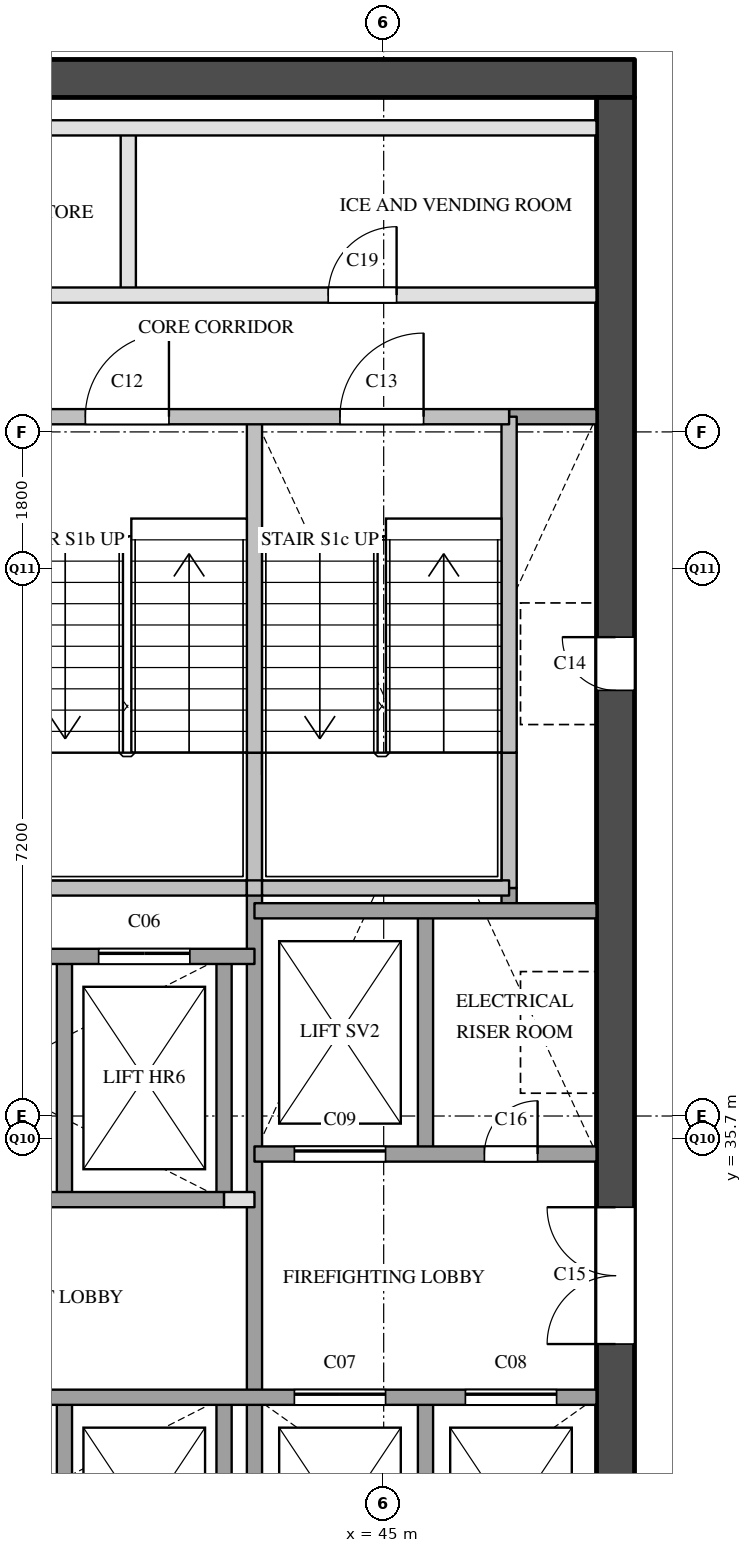
"""IFC4 building model, lengths in metres.
Left out: names, types, materials, properties, quantities, classifications, styles, units other than length and angle.
Written with IfcOpenShell. Run it as: python <this file> out.ifc"""

import sys

from ifc_helpers import new_model, si_unit, direction, frame, frame_2d, origin, place, context, subcontext, project, spatial, rectangle, extrude, element, fill, save


model = new_model("IFC4")
c1 = context("Model", 3, precision=1e-05, world=origin(), true_north=direction((0.0, 1.0)))
c2 = subcontext(c1, "Body", "Model", "MODEL_VIEW")
j1 = project(units=[si_unit("LENGTHUNIT", "METRE"), si_unit("PLANEANGLEUNIT", "RADIAN")], contexts=[c1])
p1 = place(None, origin())
s1 = spatial("IfcSite", under=j1, at=p1, CompositionType="ELEMENT")
p2 = place(p1, origin())
s2 = spatial("IfcBuilding", under=s1, at=p2, CompositionType="ELEMENT")
p3 = place(p2, frame((0.0, 0.0, 150.5)))
s3 = spatial("IfcBuildingStorey", under=s2, at=p3, CompositionType="ELEMENT", Elevation=150.5)
p4 = place(p3, frame((36.1, 49.65, 0.0), z_axis=(0.0, 0.0, 1.0), x_axis=(1.0, 0.0, 0.0)))
e1 = element("IfcWall", 1, at=p4, inside=s3, PredefinedType="SHEAR", context=c2, shape_type="SweptSolid", body=[
    extrude(rectangle(XDim=12.2, YDim=0.5, at=frame_2d((6.1, 0.0))), origin(), (0.0, 0.0, 1.0), 3.6),
])
p5 = place(p3, frame((48.05, 29.1, 0.0), z_axis=(0.0, 0.0, 1.0), x_axis=(0.0, 1.0, 0.0)))
e2 = element("IfcWall", 2, at=p5, inside=s3, PredefinedType="SHEAR", context=c2, shape_type="SweptSolid", body=[
    extrude(rectangle(XDim=20.3, YDim=0.5, at=frame_2d((10.15, 0.0))), origin(), (0.0, 0.0, 1.0), 3.6),
])
p6 = place(p5, frame((12.5, 0.0, 0.0)))
e3 = element("IfcOpeningElement", 3, at=p6, cuts=e2, PredefinedType="OPENING", context=c2, shape_type="SweptSolid", body=[
    extrude(rectangle(XDim=0.7, YDim=2.1, at=frame_2d((0.35, 1.05))), frame((0.0, 0.26, 0.0), z_axis=(0.0, -1.0, 0.0), x_axis=(1.0, 0.0, 0.0)), (0.0, 0.0, 1.0), 0.52),
])
p7 = place(p5, frame((3.9, 0.0, 0.0)))
e4 = element("IfcOpeningElement", 4, at=p7, cuts=e2, PredefinedType="OPENING", context=c2, shape_type="SweptSolid", body=[
    extrude(rectangle(XDim=1.8, YDim=2.1, at=frame_2d((0.9, 1.05))), frame((0.0, 0.26, 0.0), z_axis=(0.0, -1.0, 0.0), x_axis=(1.0, 0.0, 0.0)), (0.0, 0.0, 1.0), 0.52),
])
p8 = place(p3, frame((40.8, 29.1, 0.0), z_axis=(0.0, 0.0, 1.0), x_axis=(0.0, 1.0, 0.0)))
e5 = element("IfcWall", 5, at=p8, inside=s3, PredefinedType="SOLIDWALL", context=c2, shape_type="SweptSolid", body=[
    extrude(rectangle(XDim=3.2, YDim=0.2, at=frame_2d((1.6, 0.0))), origin(), (0.0, 0.0, 1.0), 3.6),
])
p9 = place(p3, frame((40.8, 34.9, 0.0), z_axis=(0.0, 0.0, 1.0), x_axis=(0.0, 1.0, 0.0)))
e6 = element("IfcWall", 6, at=p9, inside=s3, PredefinedType="SOLIDWALL", context=c2, shape_type="SweptSolid", body=[
    extrude(rectangle(XDim=3.2, YDim=0.2, at=frame_2d((1.6, 0.0))), origin(), (0.0, 0.0, 1.0), 3.6),
])
p10 = place(p3, frame((41.64, 46.8, 0.0), z_axis=(0.0, 0.0, 1.0), x_axis=(0.0, 1.0, 0.0)))
e7 = element("IfcWall", 7, at=p10, inside=s3, PredefinedType="PARTITIONING", context=c2, shape_type="SweptSolid", body=[
    extrude(rectangle(XDim=2.2, YDim=0.2, at=frame_2d((1.1, 0.0))), origin(), (0.0, 0.0, 1.0), 3.6),
])
p11 = place(p3, frame((42.9, 29.1, 0.0), z_axis=(0.0, 0.0, 1.0), x_axis=(0.0, 1.0, 0.0)))
e8 = element("IfcWall", 8, at=p11, inside=s3, PredefinedType="SOLIDWALL", context=c2, shape_type="SweptSolid", body=[
    extrude(rectangle(XDim=3.2, YDim=0.2, at=frame_2d((1.6, 0.0))), origin(), (0.0, 0.0, 1.0), 3.6),
])
p12 = place(p3, frame((42.9, 34.9, 0.0), z_axis=(0.0, 0.0, 1.0), x_axis=(0.0, 1.0, 0.0)))
e9 = element("IfcWall", 9, at=p12, inside=s3, PredefinedType="SOLIDWALL", context=c2, shape_type="SweptSolid", body=[
    extrude(rectangle(XDim=3.2, YDim=0.2, at=frame_2d((1.6, 0.0))), origin(), (0.0, 0.0, 1.0), 3.6),
])
p13 = place(p3, frame((43.3, 29.1, 0.0), z_axis=(0.0, 0.0, 1.0), x_axis=(0.0, 1.0, 0.0)))
e10 = element("IfcWall", 10, at=p13, inside=s3, PredefinedType="SOLIDWALL", context=c2, shape_type="SweptSolid", body=[
    extrude(rectangle(XDim=9.9, YDim=0.2, at=frame_2d((4.95, 0.0))), origin(), (0.0, 0.0, 1.0), 3.6),
])
p14 = place(p3, frame((43.3, 39.0, 0.0), z_axis=(0.0, 0.0, 1.0), x_axis=(0.0, 1.0, 0.0)))
e11 = element("IfcWall", 11, at=p14, inside=s3, PredefinedType="SOLIDWALL", context=c2, shape_type="SweptSolid", body=[
    extrude(rectangle(XDim=1.78, YDim=0.2, at=frame_2d((0.89, 0.0))), origin(), (0.0, 0.0, 1.0), 3.6),
])
p15 = place(p3, frame((43.3, 40.78, 0.0), z_axis=(0.0, 0.0, 1.0), x_axis=(0.0, 1.0, 0.0)))
e12 = element("IfcWall", 12, at=p15, inside=s3, PredefinedType="SOLIDWALL", context=c2, shape_type="SweptSolid", body=[
    extrude(rectangle(XDim=4.42, YDim=0.2, at=frame_2d((2.21, 0.0))), origin(), (0.0, 0.0, 1.0), 3.6),
])
for number, where, z_axis, x_axis in (
    (13, (45.55, 29.1, 0.0), (0.0, 0.0, 1.0), (0.0, 1.0, 0.0)),
    (14, (45.55, 35.5, 0.0), (0.0, 0.0, 1.0), (0.0, 1.0, 0.0)),
):
    element("IfcWall", number, at=place(p3, frame(where, z_axis=z_axis, x_axis=x_axis)), inside=s3, PredefinedType="SOLIDWALL", context=c2, shape_type="SweptSolid", body=[
        extrude(rectangle(XDim=3.2, YDim=0.2, at=frame_2d((1.6, 0.0))), origin(), (0.0, 0.0, 1.0), 3.6),
    ])
p16 = place(p3, frame((46.65, 38.7, 0.0), z_axis=(0.0, 0.0, 1.0), x_axis=(0.0, 1.0, 0.0)))
e15 = element("IfcWall", 15, at=p16, inside=s3, PredefinedType="SOLIDWALL", context=c2, shape_type="SweptSolid", body=[
    extrude(rectangle(XDim=0.3, YDim=0.2, at=frame_2d((0.15, 0.0))), origin(), (0.0, 0.0, 1.0), 3.6),
])
p17 = place(p3, frame((46.65, 39.0, 0.0), z_axis=(0.0, 0.0, 1.0), x_axis=(0.0, 1.0, 0.0)))
e16 = element("IfcWall", 16, at=p17, inside=s3, PredefinedType="SOLIDWALL", context=c2, shape_type="SweptSolid", body=[
    extrude(rectangle(XDim=1.78, YDim=0.2, at=frame_2d((0.89, 0.0))), origin(), (0.0, 0.0, 1.0), 3.6),
])
p18 = place(p3, frame((46.65, 40.78, 0.0), z_axis=(0.0, 0.0, 1.0), x_axis=(0.0, 1.0, 0.0)))
e17 = element("IfcWall", 17, at=p18, inside=s3, PredefinedType="SOLIDWALL", context=c2, shape_type="SweptSolid", body=[
    extrude(rectangle(XDim=4.42, YDim=0.2, at=frame_2d((2.21, 0.0))), origin(), (0.0, 0.0, 1.0), 3.6),
])
p19 = place(p3, frame((36.6, 32.3, 0.0), z_axis=(0.0, 0.0, 1.0), x_axis=(1.0, 0.0, 0.0)))
e18 = element("IfcWall", 18, at=p19, inside=s3, PredefinedType="SOLIDWALL", context=c2, shape_type="SweptSolid", body=[
    extrude(rectangle(XDim=11.2, YDim=0.2, at=frame_2d((5.6, 0.0))), origin(), (0.0, 0.0, 1.0), 3.6),
])
p20 = place(p19, frame((7.225, 0.0, 0.0)))
e19 = element("IfcOpeningElement", 19, at=p20, cuts=e18, PredefinedType="OPENING", context=c2, shape_type="SweptSolid", body=[
    extrude(rectangle(XDim=1.2, YDim=2.1, at=frame_2d((0.6, 1.05))), frame((0.0, 0.11, 0.0), z_axis=(0.0, -1.0, 0.0), x_axis=(1.0, 0.0, 0.0)), (0.0, 0.0, 1.0), 0.22),
])
p21 = place(p19, frame((9.475, 0.0, 0.0)))
e20 = element("IfcOpeningElement", 20, at=p21, cuts=e18, PredefinedType="OPENING", context=c2, shape_type="SweptSolid", body=[
    extrude(rectangle(XDim=1.2, YDim=2.1, at=frame_2d((0.6, 1.05))), frame((0.0, 0.11, 0.0), z_axis=(0.0, -1.0, 0.0), x_axis=(1.0, 0.0, 0.0)), (0.0, 0.0, 1.0), 0.22),
])
p22 = place(p3, frame((42.9, 34.9, 0.0), z_axis=(0.0, 0.0, 1.0), x_axis=(1.0, 0.0, 0.0)))
e21 = element("IfcWall", 21, at=p22, inside=s3, PredefinedType="PARTITIONING", context=c2, shape_type="SweptSolid", body=[
    extrude(rectangle(XDim=0.4, YDim=0.2, at=frame_2d((0.2, 0.0))), origin(), (0.0, 0.0, 1.0), 3.6),
])
p23 = place(p3, frame((36.6, 34.9, 0.0), z_axis=(0.0, 0.0, 1.0), x_axis=(1.0, 0.0, 0.0)))
e22 = element("IfcWall", 22, at=p23, inside=s3, PredefinedType="SOLIDWALL", context=c2, shape_type="SweptSolid", body=[
    extrude(rectangle(XDim=6.3, YDim=0.2, at=frame_2d((3.15, 0.0))), origin(), (0.0, 0.0, 1.0), 3.6),
])
p24 = place(p3, frame((43.3, 35.5, 0.0), z_axis=(0.0, 0.0, 1.0), x_axis=(1.0, 0.0, 0.0)))
e23 = element("IfcWall", 23, at=p24, inside=s3, PredefinedType="SOLIDWALL", context=c2, shape_type="SweptSolid", body=[
    extrude(rectangle(XDim=4.5, YDim=0.2, at=frame_2d((2.25, 0.0))), origin(), (0.0, 0.0, 1.0), 3.6),
])
p25 = place(p24, frame((0.525, 0.0, 0.0)))
e24 = element("IfcOpeningElement", 24, at=p25, cuts=e23, PredefinedType="OPENING", context=c2, shape_type="SweptSolid", body=[
    extrude(rectangle(XDim=1.2, YDim=2.1, at=frame_2d((0.6, 1.05))), frame((0.0, 0.11, 0.0), z_axis=(0.0, -1.0, 0.0), x_axis=(1.0, 0.0, 0.0)), (0.0, 0.0, 1.0), 0.22),
])
p26 = place(p24, frame((3.025, 0.0, 0.0)))
e25 = element("IfcOpeningElement", 25, at=p26, cuts=e23, PredefinedType="OPENING", context=c2, shape_type="SweptSolid", body=[
    extrude(rectangle(XDim=0.7, YDim=2.1, at=frame_2d((0.35, 1.05))), frame((0.0, 0.11, 0.0), z_axis=(0.0, -1.0, 0.0), x_axis=(1.0, 0.0, 0.0)), (0.0, 0.0, 1.0), 0.22),
])
p27 = place(p3, frame((36.6, 38.1, 0.0), z_axis=(0.0, 0.0, 1.0), x_axis=(1.0, 0.0, 0.0)))
e26 = element("IfcWall", 26, at=p27, inside=s3, PredefinedType="SOLIDWALL", context=c2, shape_type="SweptSolid", body=[
    extrude(rectangle(XDim=6.7, YDim=0.2, at=frame_2d((3.35, 0.0))), origin(), (0.0, 0.0, 1.0), 3.6),
])
p28 = place(p27, frame((0.45, 0.0, 0.0)))
e27 = element("IfcOpeningElement", 27, at=p28, cuts=e26, PredefinedType="OPENING", context=c2, shape_type="SweptSolid", body=[
    extrude(rectangle(XDim=1.2, YDim=2.1, at=frame_2d((0.6, 1.05))), frame((0.0, 0.11, 0.0), z_axis=(0.0, -1.0, 0.0), x_axis=(1.0, 0.0, 0.0)), (0.0, 0.0, 1.0), 0.22),
])
p29 = place(p27, frame((2.55, 0.0, 0.0)))
e28 = element("IfcOpeningElement", 28, at=p29, cuts=e26, PredefinedType="OPENING", context=c2, shape_type="SweptSolid", body=[
    extrude(rectangle(XDim=1.2, YDim=2.1, at=frame_2d((0.6, 1.05))), frame((0.0, 0.11, 0.0), z_axis=(0.0, -1.0, 0.0), x_axis=(1.0, 0.0, 0.0)), (0.0, 0.0, 1.0), 0.22),
])
p30 = place(p27, frame((4.65, 0.0, 0.0)))
e29 = element("IfcOpeningElement", 29, at=p30, cuts=e26, PredefinedType="OPENING", context=c2, shape_type="SweptSolid", body=[
    extrude(rectangle(XDim=1.2, YDim=2.1, at=frame_2d((0.6, 1.05))), frame((0.0, 0.11, 0.0), z_axis=(0.0, -1.0, 0.0), x_axis=(1.0, 0.0, 0.0)), (0.0, 0.0, 1.0), 0.22),
])
p31 = place(p3, frame((43.3, 38.7, 0.0), z_axis=(0.0, 0.0, 1.0), x_axis=(1.0, 0.0, 0.0)))
e30 = element("IfcWall", 30, at=p31, inside=s3, PredefinedType="SOLIDWALL", context=c2, shape_type="SweptSolid", body=[
    extrude(rectangle(XDim=4.5, YDim=0.2, at=frame_2d((2.25, 0.0))), origin(), (0.0, 0.0, 1.0), 3.6),
])
p32 = place(p3, frame((40.05, 39.0, 0.0), z_axis=(0.0, 0.0, 1.0), x_axis=(1.0, 0.0, 0.0)))
e31 = element("IfcWall", 31, at=p32, inside=s3, PredefinedType="SOLIDWALL", context=c2, shape_type="SweptSolid", body=[
    extrude(rectangle(XDim=3.15, YDim=0.2, at=frame_2d((1.575, 0.0))), origin(), (0.0, 0.0, 1.0), 3.6),
])
p33 = place(p3, frame((43.2, 39.0, 0.0), z_axis=(0.0, 0.0, 1.0), x_axis=(1.0, 0.0, 0.0)))
e32 = element("IfcWall", 32, at=p33, inside=s3, PredefinedType="SOLIDWALL", context=c2, shape_type="SweptSolid", body=[
    extrude(rectangle(XDim=0.2, YDim=0.2, at=frame_2d((0.1, 0.0))), origin(), (0.0, 0.0, 1.0), 3.6),
])
p34 = place(p3, frame((43.4, 39.0, 0.0), z_axis=(0.0, 0.0, 1.0), x_axis=(1.0, 0.0, 0.0)))
e33 = element("IfcWall", 33, at=p34, inside=s3, PredefinedType="SOLIDWALL", context=c2, shape_type="SweptSolid", body=[
    extrude(rectangle(XDim=3.25, YDim=0.2, at=frame_2d((1.625, 0.0))), origin(), (0.0, 0.0, 1.0), 3.6),
])
p35 = place(p3, frame((46.65, 45.2, 0.0), z_axis=(0.0, 0.0, 1.0), x_axis=(1.0, 0.0, 0.0)))
e34 = element("IfcWall", 34, at=p35, inside=s3, PredefinedType="SOLIDWALL", context=c2, shape_type="SweptSolid", body=[
    extrude(rectangle(XDim=1.15, YDim=0.2, at=frame_2d((0.575, 0.0))), origin(), (0.0, 0.0, 1.0), 3.6),
])
p36 = place(p3, frame((36.6, 45.2, 0.0), z_axis=(0.0, 0.0, 1.0), x_axis=(1.0, 0.0, 0.0)))
e35 = element("IfcWall", 35, at=p36, inside=s3, PredefinedType="SOLIDWALL", context=c2, shape_type="SweptSolid", body=[
    extrude(rectangle(XDim=10.05, YDim=0.2, at=frame_2d((5.025, 0.0))), origin(), (0.0, 0.0, 1.0), 3.6),
])
p37 = place(p36, frame((1.125, 0.0, 0.0)))
e36 = element("IfcOpeningElement", 36, at=p37, cuts=e35, PredefinedType="OPENING", context=c2, shape_type="SweptSolid", body=[
    extrude(rectangle(XDim=1.1, YDim=2.1, at=frame_2d((0.55, 1.05))), frame((0.0, 0.11, 0.0), z_axis=(0.0, -1.0, 0.0), x_axis=(1.0, 0.0, 0.0)), (0.0, 0.0, 1.0), 0.22),
])
p38 = place(p36, frame((4.475, 0.0, 0.0)))
e37 = element("IfcOpeningElement", 37, at=p38, cuts=e35, PredefinedType="OPENING", context=c2, shape_type="SweptSolid", body=[
    extrude(rectangle(XDim=1.1, YDim=2.1, at=frame_2d((0.55, 1.05))), frame((0.0, 0.11, 0.0), z_axis=(0.0, -1.0, 0.0), x_axis=(1.0, 0.0, 0.0)), (0.0, 0.0, 1.0), 0.22),
])
p39 = place(p36, frame((7.825, 0.0, 0.0)))
e38 = element("IfcOpeningElement", 38, at=p39, cuts=e35, PredefinedType="OPENING", context=c2, shape_type="SweptSolid", body=[
    extrude(rectangle(XDim=1.1, YDim=2.1, at=frame_2d((0.55, 1.05))), frame((0.0, 0.11, 0.0), z_axis=(0.0, -1.0, 0.0), x_axis=(1.0, 0.0, 0.0)), (0.0, 0.0, 1.0), 0.22),
])
p40 = place(p3, frame((36.6, 46.8, 0.0), z_axis=(0.0, 0.0, 1.0), x_axis=(1.0, 0.0, 0.0)))
e39 = element("IfcWall", 39, at=p40, inside=s3, PredefinedType="PARTITIONING", context=c2, shape_type="SweptSolid", body=[
    extrude(rectangle(XDim=11.2, YDim=0.2, at=frame_2d((5.6, 0.0))), origin(), (0.0, 0.0, 1.0), 3.6),
])
p41 = place(p40, frame((2.07, 0.0, 0.0)))
e40 = element("IfcOpeningElement", 40, at=p41, cuts=e39, PredefinedType="OPENING", context=c2, shape_type="SweptSolid", body=[
    extrude(rectangle(XDim=0.9, YDim=2.1, at=frame_2d((0.45, 1.05))), frame((0.0, 0.11, 0.0), z_axis=(0.0, -1.0, 0.0), x_axis=(1.0, 0.0, 0.0)), (0.0, 0.0, 1.0), 0.22),
])
p42 = place(p40, frame((7.67, 0.0, 0.0)))
e41 = element("IfcOpeningElement", 41, at=p42, cuts=e39, PredefinedType="OPENING", context=c2, shape_type="SweptSolid", body=[
    extrude(rectangle(XDim=0.9, YDim=2.1, at=frame_2d((0.45, 1.05))), frame((0.0, 0.11, 0.0), z_axis=(0.0, -1.0, 0.0), x_axis=(1.0, 0.0, 0.0)), (0.0, 0.0, 1.0), 0.22),
])
p43 = place(p3, frame((36.6, 49.0, 0.0), z_axis=(0.0, 0.0, 1.0), x_axis=(1.0, 0.0, 0.0)))
e42 = element("IfcWall", 42, at=p43, inside=s3, PredefinedType="PARTITIONING", context=c2, shape_type="SweptSolid", body=[
    extrude(rectangle(XDim=11.2, YDim=0.2, at=frame_2d((5.6, 0.0))), origin(), (0.0, 0.0, 1.0), 3.6),
])
p44 = place(p30, origin())
e43 = element("IfcDoor", 43, at=p44, inside=s3, OperationType="SLIDING_TO_LEFT", PredefinedType="DOOR", context=c2, shape_type="SweptSolid", body=[
    extrude(rectangle(XDim=1.2, YDim=2.1, at=frame_2d((0.6, 1.05))), frame((0.0, 0.025, 0.0), z_axis=(0.0, -1.0, 0.0), x_axis=(1.0, 0.0, 0.0)), (0.0, 0.0, 1.0), 0.05),
])
fill(e29, e43)
p45 = place(p20, origin())
e44 = element("IfcDoor", 44, at=p45, inside=s3, OperationType="SLIDING_TO_LEFT", PredefinedType="DOOR", context=c2, shape_type="SweptSolid", body=[
    extrude(rectangle(XDim=1.2, YDim=2.1, at=frame_2d((0.6, 1.05))), frame((0.0, 0.025, 0.0), z_axis=(0.0, -1.0, 0.0), x_axis=(1.0, 0.0, 0.0)), (0.0, 0.0, 1.0), 0.05),
])
fill(e19, e44)
p46 = place(p21, origin())
e45 = element("IfcDoor", 45, at=p46, inside=s3, OperationType="SLIDING_TO_LEFT", PredefinedType="DOOR", context=c2, shape_type="SweptSolid", body=[
    extrude(rectangle(XDim=1.2, YDim=2.1, at=frame_2d((0.6, 1.05))), frame((0.0, 0.025, 0.0), z_axis=(0.0, -1.0, 0.0), x_axis=(1.0, 0.0, 0.0)), (0.0, 0.0, 1.0), 0.05),
])
fill(e20, e45)
p47 = place(p25, origin())
e46 = element("IfcDoor", 46, at=p47, inside=s3, OperationType="SLIDING_TO_LEFT", PredefinedType="DOOR", context=c2, shape_type="SweptSolid", body=[
    extrude(rectangle(XDim=1.2, YDim=2.1, at=frame_2d((0.6, 1.05))), frame((0.0, 0.025, 0.0), z_axis=(0.0, -1.0, 0.0), x_axis=(1.0, 0.0, 0.0)), (0.0, 0.0, 1.0), 0.05),
])
fill(e24, e46)
p48 = place(p38, origin())
e47 = element("IfcDoor", 47, at=p48, inside=s3, OperationType="SINGLE_SWING_RIGHT", PredefinedType="DOOR", context=c2, shape_type="SweptSolid", body=[
    extrude(rectangle(XDim=1.1, YDim=2.1, at=frame_2d((0.55, 1.05))), frame((0.0, 0.025, 0.0), z_axis=(0.0, -1.0, 0.0), x_axis=(1.0, 0.0, 0.0)), (0.0, 0.0, 1.0), 0.05),
])
fill(e37, e47)
p49 = place(p39, origin())
e48 = element("IfcDoor", 48, at=p49, inside=s3, OperationType="SINGLE_SWING_RIGHT", PredefinedType="DOOR", context=c2, shape_type="SweptSolid", body=[
    extrude(rectangle(XDim=1.1, YDim=2.1, at=frame_2d((0.55, 1.05))), frame((0.0, 0.025, 0.0), z_axis=(0.0, -1.0, 0.0), x_axis=(1.0, 0.0, 0.0)), (0.0, 0.0, 1.0), 0.05),
])
fill(e38, e48)
p50 = place(p6, origin())
e49 = element("IfcDoor", 49, at=p50, inside=s3, OperationType="SINGLE_SWING_RIGHT", PredefinedType="DOOR", context=c2, shape_type="SweptSolid", body=[
    extrude(rectangle(XDim=0.7, YDim=2.1, at=frame_2d((0.35, 1.05))), frame((0.0, 0.025, 0.0), z_axis=(0.0, -1.0, 0.0), x_axis=(1.0, 0.0, 0.0)), (0.0, 0.0, 1.0), 0.05),
])
fill(e3, e49)
p51 = place(p7, origin())
e50 = element("IfcDoor", 50, at=p51, inside=s3, OperationType="DOUBLE_DOOR_SINGLE_SWING", PredefinedType="DOOR", context=c2, shape_type="SweptSolid", body=[
    extrude(rectangle(XDim=1.8, YDim=2.1, at=frame_2d((0.9, 1.05))), frame((0.0, 0.025, 0.0), z_axis=(0.0, -1.0, 0.0), x_axis=(1.0, 0.0, 0.0)), (0.0, 0.0, 1.0), 0.05),
])
fill(e4, e50)
p52 = place(p26, origin())
e51 = element("IfcDoor", 51, at=p52, inside=s3, OperationType="SINGLE_SWING_RIGHT", PredefinedType="DOOR", context=c2, shape_type="SweptSolid", body=[
    extrude(rectangle(XDim=0.7, YDim=2.1, at=frame_2d((0.35, 1.05))), frame((0.0, 0.025, 0.0), z_axis=(0.0, -1.0, 0.0), x_axis=(1.0, 0.0, 0.0)), (0.0, 0.0, 1.0), 0.05),
])
fill(e25, e51)
p53 = place(p42, origin())
e52 = element("IfcDoor", 52, at=p53, inside=s3, OperationType="SINGLE_SWING_RIGHT", PredefinedType="DOOR", context=c2, shape_type="SweptSolid", body=[
    extrude(rectangle(XDim=0.9, YDim=2.1, at=frame_2d((0.45, 1.05))), frame((0.0, 0.025, 0.0), z_axis=(0.0, -1.0, 0.0), x_axis=(1.0, 0.0, 0.0)), (0.0, 0.0, 1.0), 0.05),
])
fill(e41, e52)
save(model, sys.argv[1])
